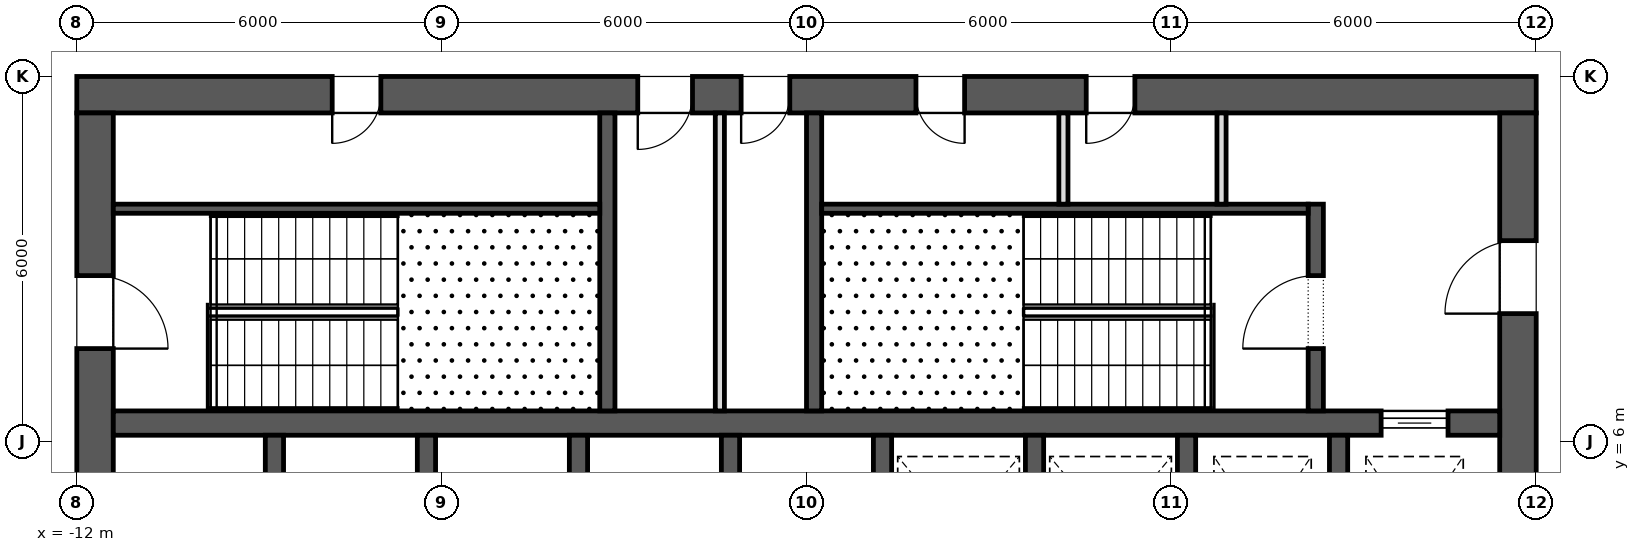
"""IFC4 building model, lengths in metres.
Left out: names, types, materials, properties, quantities, classifications, styles, units other than length and angle.
Written with IfcOpenShell. Run it as: python <this file> out.ifc"""

import sys

from ifc_helpers import new_model, si_unit, direction, frame, frame_2d, origin, place, context, subcontext, project, spatial, rectangle, extrude, element, fill, save


model = new_model("IFC4")
c1 = context("Model", 3, precision=1e-05, world=origin(), true_north=direction((0.0, 1.0)))
c2 = subcontext(c1, "Body", "Model", "MODEL_VIEW")
j1 = project(units=[si_unit("LENGTHUNIT", "METRE"), si_unit("PLANEANGLEUNIT", "RADIAN")], contexts=[c1])
p1 = place(None, origin())
s1 = spatial("IfcSite", under=j1, at=p1, CompositionType="ELEMENT")
p2 = place(p1, origin())
s2 = spatial("IfcBuilding", under=s1, at=p2, CompositionType="ELEMENT")
p3 = place(p2, frame((0.0, 0.0, 36.1)))
s3 = spatial("IfcBuildingStorey", under=s2, at=p3, CompositionType="ELEMENT", Elevation=36.1)
p4 = place(p3, frame((-12.0, 11.7, 0.0), z_axis=(0.0, 0.0, 1.0), x_axis=(1.0, 0.0, 0.0)))
e1 = element("IfcWall", 1, at=p4, inside=s3, PredefinedType="SHEAR", context=c2, shape_type="SweptSolid", body=[
    extrude(rectangle(XDim=24.0, YDim=0.6, at=frame_2d((12.0, 0.0))), origin(), (0.0, 0.0, 1.0), 4.2),
])
p5 = place(p4, frame((9.225, 0.0, 0.0)))
e2 = element("IfcOpeningElement", 2, at=p5, cuts=e1, PredefinedType="OPENING", context=c2, shape_type="SweptSolid", body=[
    extrude(rectangle(XDim=0.9, YDim=2.1, at=frame_2d((0.45, 1.05))), frame((0.0, 0.312, 0.0), z_axis=(0.0, -1.0, 0.0), x_axis=(1.0, 0.0, 0.0)), (0.0, 0.0, 1.0), 0.624),
])
p6 = place(p4, frame((10.925, 0.0, 0.0)))
e3 = element("IfcOpeningElement", 3, at=p6, cuts=e1, PredefinedType="OPENING", context=c2, shape_type="SweptSolid", body=[
    extrude(rectangle(XDim=0.8, YDim=2.1, at=frame_2d((0.4, 1.05))), frame((0.0, 0.312, 0.0), z_axis=(0.0, -1.0, 0.0), x_axis=(1.0, 0.0, 0.0)), (0.0, 0.0, 1.0), 0.624),
])
p7 = place(p4, frame((4.2, 0.0, 0.0)))
e4 = element("IfcOpeningElement", 4, at=p7, cuts=e1, PredefinedType="OPENING", context=c2, shape_type="SweptSolid", body=[
    extrude(rectangle(XDim=0.8, YDim=2.1, at=frame_2d((0.4, 1.05))), frame((0.0, 0.312, 0.0), z_axis=(0.0, -1.0, 0.0), x_axis=(1.0, 0.0, 0.0)), (0.0, 0.0, 1.0), 0.624),
])
p8 = place(p4, frame((13.8, 0.0, 0.0)))
e5 = element("IfcOpeningElement", 5, at=p8, cuts=e1, PredefinedType="OPENING", context=c2, shape_type="SweptSolid", body=[
    extrude(rectangle(XDim=0.8, YDim=2.1, at=frame_2d((0.4, 1.05))), frame((0.0, 0.312, 0.0), z_axis=(0.0, -1.0, 0.0), x_axis=(1.0, 0.0, 0.0)), (0.0, 0.0, 1.0), 0.624),
])
p9 = place(p4, frame((16.6, 0.0, 0.0)))
e6 = element("IfcOpeningElement", 6, at=p9, cuts=e1, PredefinedType="OPENING", context=c2, shape_type="SweptSolid", body=[
    extrude(rectangle(XDim=0.8, YDim=2.1, at=frame_2d((0.4, 1.05))), frame((0.0, 0.312, 0.0), z_axis=(0.0, -1.0, 0.0), x_axis=(1.0, 0.0, 0.0)), (0.0, 0.0, 1.0), 0.624),
])
p10 = place(p3, frame((11.7, -11.4, 0.0), z_axis=(0.0, 0.0, 1.0), x_axis=(0.0, 1.0, 0.0)))
e7 = element("IfcWall", 7, at=p10, inside=s3, PredefinedType="SHEAR", context=c2, shape_type="SweptSolid", body=[
    extrude(rectangle(XDim=22.8, YDim=0.6, at=frame_2d((11.4, 0.0))), origin(), (0.0, 0.0, 1.0), 4.2),
])
p11 = place(p10, frame((10.2, 0.0, 0.0)))
e8 = element("IfcOpeningElement", 8, at=p11, cuts=e7, PredefinedType="OPENING", context=c2, shape_type="SweptSolid", body=[
    extrude(rectangle(XDim=2.4, YDim=2.1, at=frame_2d((1.2, 1.05))), frame((0.0, 0.312, 0.0), z_axis=(0.0, -1.0, 0.0), x_axis=(1.0, 0.0, 0.0)), (0.0, 0.0, 1.0), 0.624),
])
p12 = place(p10, frame((19.5, 0.0, 0.0)))
e9 = element("IfcOpeningElement", 9, at=p12, cuts=e7, PredefinedType="OPENING", context=c2, shape_type="SweptSolid", body=[
    extrude(rectangle(XDim=1.2, YDim=2.1, at=frame_2d((0.6, 1.05))), frame((0.0, 0.312, 0.0), z_axis=(0.0, -1.0, 0.0), x_axis=(1.0, 0.0, 0.0)), (0.0, 0.0, 1.0), 0.624),
])
p13 = place(p10, frame((2.1, 0.0, 0.0)))
e10 = element("IfcOpeningElement", 10, at=p13, cuts=e7, PredefinedType="OPENING", context=c2, shape_type="SweptSolid", body=[
    extrude(rectangle(XDim=1.2, YDim=2.1, at=frame_2d((0.6, 1.05))), frame((0.0, 0.312, 0.0), z_axis=(0.0, -1.0, 0.0), x_axis=(1.0, 0.0, 0.0)), (0.0, 0.0, 1.0), 0.624),
])
p14 = place(p3, frame((-11.7, -11.4, 0.0), z_axis=(0.0, 0.0, 1.0), x_axis=(0.0, 1.0, 0.0)))
e11 = element("IfcWall", 11, at=p14, inside=s3, PredefinedType="SHEAR", context=c2, shape_type="SweptSolid", body=[
    extrude(rectangle(XDim=22.8, YDim=0.6, at=frame_2d((11.4, 0.0))), origin(), (0.0, 0.0, 1.0), 4.2),
])
p15 = place(p14, frame((10.2, 0.0, 0.0)))
e12 = element("IfcOpeningElement", 12, at=p15, cuts=e11, PredefinedType="OPENING", context=c2, shape_type="SweptSolid", body=[
    extrude(rectangle(XDim=2.4, YDim=2.1, at=frame_2d((1.2, 1.05))), frame((0.0, 0.312, 0.0), z_axis=(0.0, -1.0, 0.0), x_axis=(1.0, 0.0, 0.0)), (0.0, 0.0, 1.0), 0.624),
])
p16 = place(p14, frame((18.925, 0.0, 0.0)))
e13 = element("IfcOpeningElement", 13, at=p16, cuts=e11, PredefinedType="OPENING", context=c2, shape_type="SweptSolid", body=[
    extrude(rectangle(XDim=1.2, YDim=2.1, at=frame_2d((0.6, 1.05))), frame((0.0, 0.312, 0.0), z_axis=(0.0, -1.0, 0.0), x_axis=(1.0, 0.0, 0.0)), (0.0, 0.0, 1.0), 0.624),
])
p17 = place(p14, frame((2.675, 0.0, 0.0)))
e14 = element("IfcOpeningElement", 14, at=p17, cuts=e11, PredefinedType="OPENING", context=c2, shape_type="SweptSolid", body=[
    extrude(rectangle(XDim=1.2, YDim=2.1, at=frame_2d((0.6, 1.05))), frame((0.0, 0.312, 0.0), z_axis=(0.0, -1.0, 0.0), x_axis=(1.0, 0.0, 0.0)), (0.0, 0.0, 1.0), 0.624),
])
p18 = place(p3, frame((-11.4, 6.3, 0.0), z_axis=(0.0, 0.0, 1.0), x_axis=(1.0, 0.0, 0.0)))
e15 = element("IfcWall", 15, at=p18, inside=s3, PredefinedType="SHEAR", context=c2, shape_type="SweptSolid", body=[
    extrude(rectangle(XDim=22.8, YDim=0.4, at=frame_2d((11.4, 0.0))), origin(), (0.0, 0.0, 1.0), 4.2),
])
p19 = place(p18, frame((20.85, 0.0, 0.0)))
e16 = element("IfcOpeningElement", 16, at=p19, cuts=e15, PredefinedType="OPENING", context=c2, shape_type="SweptSolid", body=[
    extrude(rectangle(XDim=1.1, YDim=2.1, at=frame_2d((0.55, 1.05))), frame((0.0, 0.212, 0.0), z_axis=(0.0, -1.0, 0.0), x_axis=(1.0, 0.0, 0.0)), (0.0, 0.0, 1.0), 0.424),
])
for number, where, z_axis, x_axis in (
    (17, (-8.75, 3.2, 0.0), (0.0, 0.0, 1.0), (0.0, 1.0, 0.0)),
    (18, (-6.25, 3.2, 0.0), (0.0, 0.0, 1.0), (0.0, 1.0, 0.0)),
    (19, (-3.75, 3.2, 0.0), (0.0, 0.0, 1.0), (0.0, 1.0, 0.0)),
    (20, (-1.25, 3.2, 0.0), (0.0, 0.0, 1.0), (0.0, 1.0, 0.0)),
    (21, (1.25, 3.2, 0.0), (0.0, 0.0, 1.0), (0.0, 1.0, 0.0)),
    (22, (3.75, 3.2, 0.0), (0.0, 0.0, 1.0), (0.0, 1.0, 0.0)),
    (23, (6.25, 3.2, 0.0), (0.0, 0.0, 1.0), (0.0, 1.0, 0.0)),
    (24, (8.75, 3.2, 0.0), (0.0, 0.0, 1.0), (0.0, 1.0, 0.0)),
):
    element("IfcWall", number, at=place(p3, frame(where, z_axis=z_axis, x_axis=x_axis)), inside=s3, PredefinedType="SHEAR", context=c2, shape_type="SweptSolid", body=[
        extrude(rectangle(XDim=2.9, YDim=0.3, at=frame_2d((1.45, 0.0))), origin(), (0.0, 0.0, 1.0), 4.2),
    ])
for number, where, z_axis, x_axis in (
    (25, (-3.275, 6.5, 0.0), (0.0, 0.0, 1.0), (0.0, 1.0, 0.0)),
    (26, (0.125, 6.5, 0.0), (0.0, 0.0, 1.0), (0.0, 1.0, 0.0)),
):
    element("IfcWall", number, at=place(p3, frame(where, z_axis=z_axis, x_axis=x_axis)), inside=s3, PredefinedType="SHEAR", context=c2, shape_type="SweptSolid", body=[
        extrude(rectangle(XDim=4.9, YDim=0.25, at=frame_2d((2.45, 0.0))), origin(), (0.0, 0.0, 1.0), 3.9),
    ])
p20 = place(p3, frame((8.375, 6.5, 0.0), z_axis=(0.0, 0.0, 1.0), x_axis=(0.0, 1.0, 0.0)))
e27 = element("IfcWall", 27, at=p20, inside=s3, PredefinedType="SHEAR", context=c2, shape_type="SweptSolid", body=[
    extrude(rectangle(XDim=3.4, YDim=0.25, at=frame_2d((1.7, 0.0))), origin(), (0.0, 0.0, 1.0), 3.9),
])
p21 = place(p20, frame((1.025, 0.0, 0.0)))
e28 = element("IfcOpeningElement", 28, at=p21, cuts=e27, PredefinedType="OPENING", context=c2, shape_type="SweptSolid", body=[
    extrude(rectangle(XDim=1.2, YDim=2.1, at=frame_2d((0.6, 1.05))), frame((0.0, 0.137, 0.0), z_axis=(0.0, -1.0, 0.0), x_axis=(1.0, 0.0, 0.0)), (0.0, 0.0, 1.0), 0.274),
])
for number, where, z_axis, x_axis in (
    (29, (-11.4, 9.825, 0.0), (0.0, 0.0, 1.0), (1.0, 0.0, 0.0)),
    (30, (0.25, 9.825, 0.0), (0.0, 0.0, 1.0), (1.0, 0.0, 0.0)),
):
    element("IfcWall", number, at=place(p3, frame(where, z_axis=z_axis, x_axis=x_axis)), inside=s3, PredefinedType="SHEAR", context=c2, shape_type="SweptSolid", body=[
        extrude(rectangle(XDim=8.0, YDim=0.15, at=frame_2d((4.0, 0.0))), origin(), (0.0, 0.0, 1.0), 3.9),
    ])
p22 = place(p3, frame((-1.425, 6.5, 0.0), z_axis=(0.0, 0.0, 1.0), x_axis=(0.0, 1.0, 0.0)))
e31 = element("IfcWall", 31, at=p22, inside=s3, PredefinedType="PARTITIONING", context=c2, shape_type="SweptSolid", body=[
    extrude(rectangle(XDim=4.9, YDim=0.15, at=frame_2d((2.45, 0.0))), origin(), (0.0, 0.0, 1.0), 3.9),
])
for number, where, z_axis, x_axis in (
    (32, (4.225, 9.9, 0.0), (0.0, 0.0, 1.0), (0.0, 1.0, 0.0)),
    (33, (6.825, 9.9, 0.0), (0.0, 0.0, 1.0), (0.0, 1.0, 0.0)),
):
    element("IfcWall", number, at=place(p3, frame(where, z_axis=z_axis, x_axis=x_axis)), inside=s3, PredefinedType="PARTITIONING", context=c2, shape_type="SweptSolid", body=[
        extrude(rectangle(XDim=1.5, YDim=0.15, at=frame_2d((0.75, 0.0))), origin(), (0.0, 0.0, 1.0), 3.9),
    ])
p23 = place(p19, origin())
e34 = element("IfcDoor", 34, at=p23, inside=s3, OperationType="SLIDING_TO_LEFT", PredefinedType="DOOR", context=c2, shape_type="SweptSolid", body=[
    extrude(rectangle(XDim=1.1, YDim=2.1, at=frame_2d((0.55, 1.05))), frame((0.0, 0.025, 0.0), z_axis=(0.0, -1.0, 0.0), x_axis=(1.0, 0.0, 0.0)), (0.0, 0.0, 1.0), 0.05),
])
fill(e16, e34)
p24 = place(p16, frame((1.2, 0.0, 0.0), z_axis=(0.0, 0.0, 1.0), x_axis=(-1.0, 0.0, 0.0)))
e35 = element("IfcDoor", 35, at=p24, inside=s3, OperationType="SINGLE_SWING_LEFT", PredefinedType="DOOR", context=c2, shape_type="SweptSolid", body=[
    extrude(rectangle(XDim=1.2, YDim=2.1, at=frame_2d((0.6, 1.05))), frame((0.0, 0.025, 0.0), z_axis=(0.0, -1.0, 0.0), x_axis=(1.0, 0.0, 0.0)), (0.0, 0.0, 1.0), 0.05),
])
fill(e13, e35)
p25 = place(p21, origin())
e36 = element("IfcDoor", 36, at=p25, inside=s3, OperationType="SINGLE_SWING_RIGHT", PredefinedType="DOOR", context=c2, shape_type="SweptSolid", body=[
    extrude(rectangle(XDim=1.2, YDim=2.1, at=frame_2d((0.6, 1.05))), frame((0.0, 0.025, 0.0), z_axis=(0.0, -1.0, 0.0), x_axis=(1.0, 0.0, 0.0)), (0.0, 0.0, 1.0), 0.05),
])
fill(e28, e36)
p26 = place(p12, origin())
e37 = element("IfcDoor", 37, at=p26, inside=s3, OperationType="SINGLE_SWING_RIGHT", PredefinedType="DOOR", context=c2, shape_type="SweptSolid", body=[
    extrude(rectangle(XDim=1.2, YDim=2.1, at=frame_2d((0.6, 1.05))), frame((0.0, 0.025, 0.0), z_axis=(0.0, -1.0, 0.0), x_axis=(1.0, 0.0, 0.0)), (0.0, 0.0, 1.0), 0.05),
])
fill(e9, e37)
p27 = place(p5, frame((0.9, 0.0, 0.0), z_axis=(0.0, 0.0, 1.0), x_axis=(-1.0, 0.0, 0.0)))
e38 = element("IfcDoor", 38, at=p27, inside=s3, OperationType="SINGLE_SWING_LEFT", PredefinedType="DOOR", context=c2, shape_type="SweptSolid", body=[
    extrude(rectangle(XDim=0.9, YDim=2.1, at=frame_2d((0.45, 1.05))), frame((0.0, 0.025, 0.0), z_axis=(0.0, -1.0, 0.0), x_axis=(1.0, 0.0, 0.0)), (0.0, 0.0, 1.0), 0.05),
])
fill(e2, e38)
p28 = place(p6, frame((0.8, 0.0, 0.0), z_axis=(0.0, 0.0, 1.0), x_axis=(-1.0, 0.0, 0.0)))
e39 = element("IfcDoor", 39, at=p28, inside=s3, OperationType="SINGLE_SWING_LEFT", PredefinedType="DOOR", context=c2, shape_type="SweptSolid", body=[
    extrude(rectangle(XDim=0.8, YDim=2.1, at=frame_2d((0.4, 1.05))), frame((0.0, 0.025, 0.0), z_axis=(0.0, -1.0, 0.0), x_axis=(1.0, 0.0, 0.0)), (0.0, 0.0, 1.0), 0.05),
])
fill(e3, e39)
p29 = place(p7, frame((0.8, 0.0, 0.0), z_axis=(0.0, 0.0, 1.0), x_axis=(-1.0, 0.0, 0.0)))
e40 = element("IfcDoor", 40, at=p29, inside=s3, OperationType="SINGLE_SWING_LEFT", PredefinedType="DOOR", context=c2, shape_type="SweptSolid", body=[
    extrude(rectangle(XDim=0.8, YDim=2.1, at=frame_2d((0.4, 1.05))), frame((0.0, 0.025, 0.0), z_axis=(0.0, -1.0, 0.0), x_axis=(1.0, 0.0, 0.0)), (0.0, 0.0, 1.0), 0.05),
])
fill(e4, e40)
p30 = place(p8, frame((0.8, 0.0, 0.0), z_axis=(0.0, 0.0, 1.0), x_axis=(-1.0, 0.0, 0.0)))
e41 = element("IfcDoor", 41, at=p30, inside=s3, OperationType="SINGLE_SWING_RIGHT", PredefinedType="DOOR", context=c2, shape_type="SweptSolid", body=[
    extrude(rectangle(XDim=0.8, YDim=2.1, at=frame_2d((0.4, 1.05))), frame((0.0, 0.025, 0.0), z_axis=(0.0, -1.0, 0.0), x_axis=(1.0, 0.0, 0.0)), (0.0, 0.0, 1.0), 0.05),
])
fill(e5, e41)
p31 = place(p9, frame((0.8, 0.0, 0.0), z_axis=(0.0, 0.0, 1.0), x_axis=(-1.0, 0.0, 0.0)))
e42 = element("IfcDoor", 42, at=p31, inside=s3, OperationType="SINGLE_SWING_LEFT", PredefinedType="DOOR", context=c2, shape_type="SweptSolid", body=[
    extrude(rectangle(XDim=0.8, YDim=2.1, at=frame_2d((0.4, 1.05))), frame((0.0, 0.025, 0.0), z_axis=(0.0, -1.0, 0.0), x_axis=(1.0, 0.0, 0.0)), (0.0, 0.0, 1.0), 0.05),
])
fill(e6, e42)
save(model, sys.argv[1])
